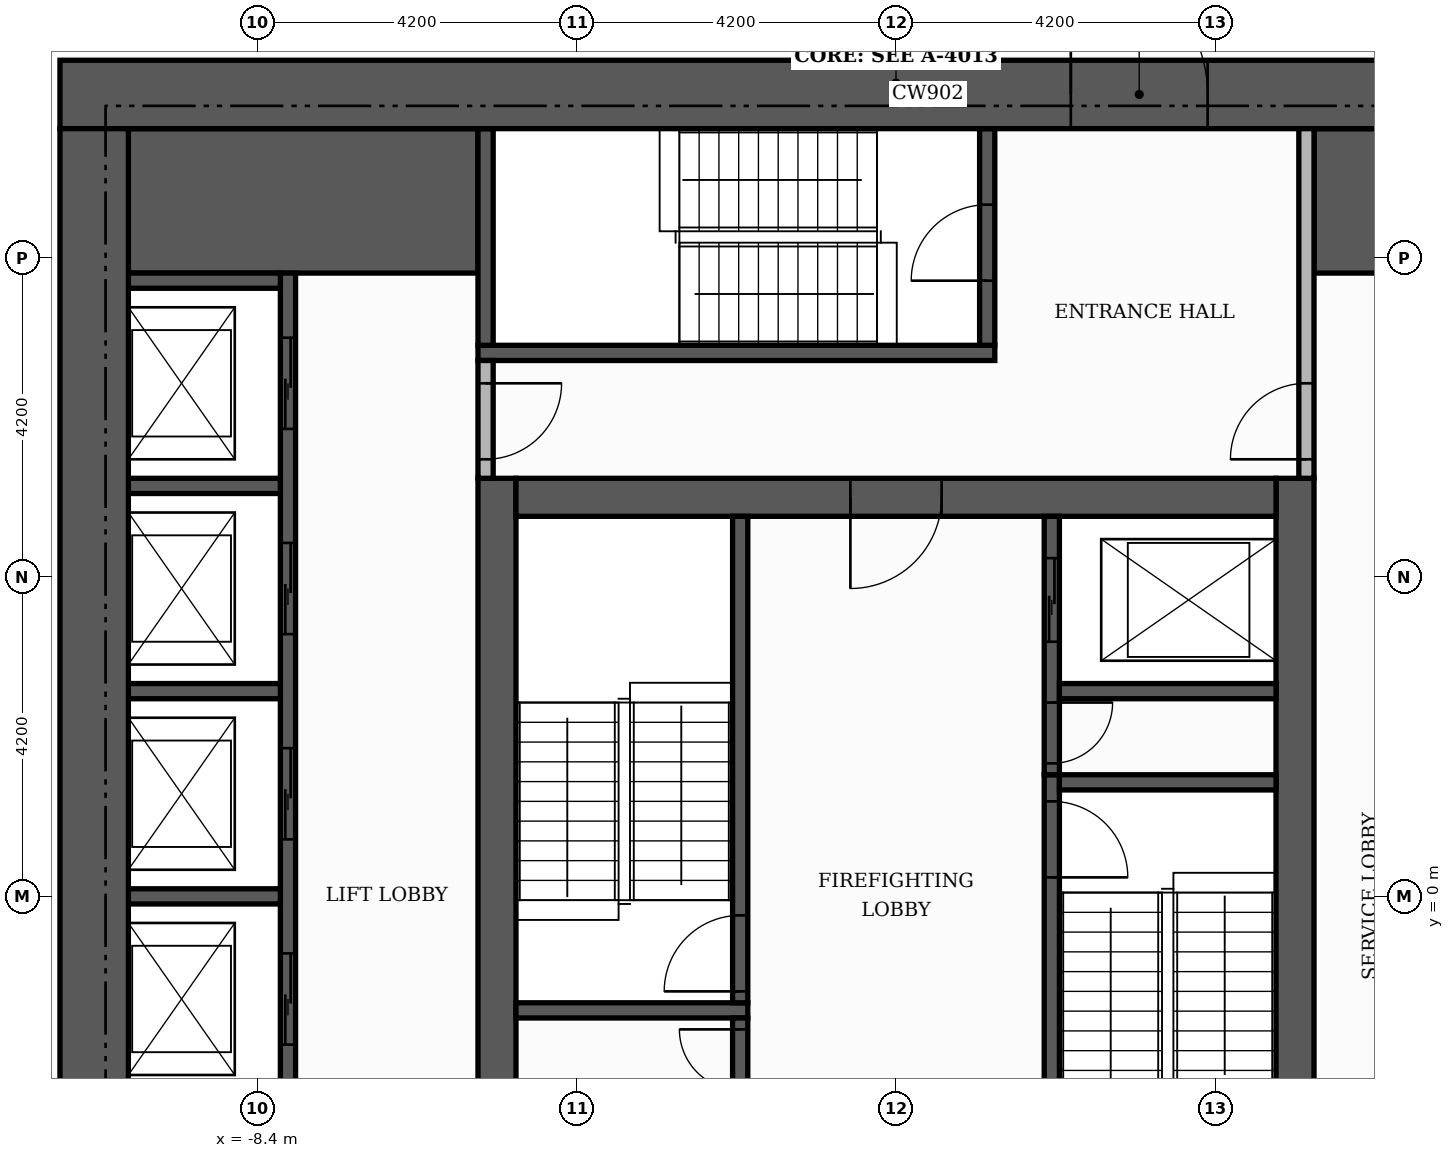
"""IFC4 building model, lengths in metres.
Left out: names, types, materials, properties, quantities, classifications, styles, units other than length and angle.
Written with IfcOpenShell. Run it as: python <this file> out.ifc"""

import sys

from ifc_helpers import new_model, si_unit, direction, frame, frame_2d, origin, place, context, subcontext, project, spatial, rectangle, extrude, element, fill, save


model = new_model("IFC4")
c1 = context("Model", 3, precision=1e-05, world=origin(), true_north=direction((0.0, 1.0)))
c2 = subcontext(c1, "Body", "Model", "MODEL_VIEW")
j1 = project(units=[si_unit("LENGTHUNIT", "METRE"), si_unit("PLANEANGLEUNIT", "RADIAN")], contexts=[c1])
p1 = place(None, origin())
s1 = spatial("IfcSite", under=j1, at=p1, CompositionType="ELEMENT")
p2 = place(p1, origin())
s2 = spatial("IfcBuilding", under=s1, at=p2, CompositionType="ELEMENT")
p3 = place(p2, frame((0.0, 0.0, 79.2)))
s3 = spatial("IfcBuildingStorey", under=s2, at=p3, CompositionType="ELEMENT", Elevation=79.2)
for number, where, z_axis, x_axis in (
    (1, (-5.25, -5.0, 0.0), (0.0, 0.0, 1.0), (0.0, 1.0, 0.0)),
    (2, (5.25, -5.0, 0.0), (0.0, 0.0, 1.0), (0.0, 1.0, 0.0)),
):
    element("IfcWall", number, at=place(p3, frame(where, z_axis=z_axis, x_axis=x_axis)), inside=s3, PredefinedType="SHEAR", context=c2, shape_type="SweptSolid", body=[
        extrude(rectangle(XDim=10.5, YDim=0.5, at=frame_2d((5.25, 0.0))), origin(), (0.0, 0.0, 1.0), 3.48),
    ])
p4 = place(p3, frame((-5.0, 5.25, 0.0), z_axis=(0.0, 0.0, 1.0), x_axis=(1.0, 0.0, 0.0)))
e3 = element("IfcWall", 3, at=p4, inside=s3, PredefinedType="SHEAR", context=c2, shape_type="SweptSolid", body=[
    extrude(rectangle(XDim=10.0, YDim=0.5, at=frame_2d((5.0, 0.0))), origin(), (0.0, 0.0, 1.0), 3.48),
])
p5 = place(p4, frame((4.4, 0.0, 0.0)))
e4 = element("IfcOpeningElement", 4, at=p5, cuts=e3, PredefinedType="OPENING", context=c2, shape_type="SweptSolid", body=[
    extrude(rectangle(XDim=1.2, YDim=2.1, at=frame_2d((0.6, 1.05))), frame((0.0, 0.26, 0.0), z_axis=(0.0, -1.0, 0.0), x_axis=(1.0, 0.0, 0.0)), (0.0, 0.0, 1.0), 0.52),
])
for number, where, z_axis, x_axis in (
    (5, (-10.1, 9.15, 0.0), (0.0, 0.0, 1.0), (1.0, 0.0, 0.0)),
    (6, (5.5, 9.15, 0.0), (0.0, 0.0, 1.0), (1.0, 0.0, 0.0)),
):
    element("IfcWall", number, at=place(p3, frame(where, z_axis=z_axis, x_axis=x_axis)), inside=s3, PredefinedType="SHEAR", context=c2, shape_type="SweptSolid", body=[
        extrude(rectangle(XDim=4.6, YDim=1.9, at=frame_2d((2.3, 0.0))), origin(), (0.0, 0.0, 1.0), 3.48),
    ])
p6 = place(p3, frame((2.05, -5.0, 0.0), z_axis=(0.0, 0.0, 1.0), x_axis=(0.0, 1.0, 0.0)))
e7 = element("IfcWall", 7, at=p6, inside=s3, PredefinedType="SHEAR", context=c2, shape_type="SweptSolid", body=[
    extrude(rectangle(XDim=6.6, YDim=0.2, at=frame_2d((3.3, 0.0))), origin(), (0.0, 0.0, 1.0), 3.48),
])
p7 = place(p6, frame((5.25, 0.0, 0.0)))
e8 = element("IfcOpeningElement", 8, at=p7, cuts=e7, PredefinedType="OPENING", context=c2, shape_type="SweptSolid", body=[
    extrude(rectangle(XDim=1.0, YDim=2.1, at=frame_2d((0.5, 1.05))), frame((0.0, 0.11, 0.0), z_axis=(0.0, -1.0, 0.0), x_axis=(1.0, 0.0, 0.0)), (0.0, 0.0, 1.0), 0.22),
])
p8 = place(p3, frame((-5.0, -1.5, 0.0), z_axis=(0.0, 0.0, 1.0), x_axis=(1.0, 0.0, 0.0)))
e9 = element("IfcWall", 9, at=p8, inside=s3, PredefinedType="SHEAR", context=c2, shape_type="SweptSolid", body=[
    extrude(rectangle(XDim=3.05, YDim=0.2, at=frame_2d((1.525, 0.0))), origin(), (0.0, 0.0, 1.0), 3.48),
])
p9 = place(p3, frame((-2.05, -1.4, 0.0), z_axis=(0.0, 0.0, 1.0), x_axis=(0.0, 1.0, 0.0)))
e10 = element("IfcWall", 10, at=p9, inside=s3, PredefinedType="SHEAR", context=c2, shape_type="SweptSolid", body=[
    extrude(rectangle(XDim=6.4, YDim=0.2, at=frame_2d((3.2, 0.0))), origin(), (0.0, 0.0, 1.0), 3.48),
])
p10 = place(p9, frame((0.15, 0.0, 0.0)))
e11 = element("IfcOpeningElement", 11, at=p10, cuts=e10, PredefinedType="OPENING", context=c2, shape_type="SweptSolid", body=[
    extrude(rectangle(XDim=1.0, YDim=2.1, at=frame_2d((0.5, 1.05))), frame((0.0, 0.11, 0.0), z_axis=(0.0, -1.0, 0.0), x_axis=(1.0, 0.0, 0.0)), (0.0, 0.0, 1.0), 0.22),
])
p11 = place(p3, frame((2.15, 1.5, 0.0), z_axis=(0.0, 0.0, 1.0), x_axis=(1.0, 0.0, 0.0)))
e12 = element("IfcWall", 12, at=p11, inside=s3, PredefinedType="SHEAR", context=c2, shape_type="SweptSolid", body=[
    extrude(rectangle(XDim=2.85, YDim=0.2, at=frame_2d((1.425, 0.0))), origin(), (0.0, 0.0, 1.0), 3.48),
])
p12 = place(p3, frame((-5.5, 7.15, 0.0), z_axis=(0.0, 0.0, 1.0), x_axis=(1.0, 0.0, 0.0)))
e13 = element("IfcWall", 13, at=p12, inside=s3, PredefinedType="SHEAR", context=c2, shape_type="SweptSolid", body=[
    extrude(rectangle(XDim=6.8, YDim=0.2, at=frame_2d((3.4, 0.0))), origin(), (0.0, 0.0, 1.0), 3.48),
])
p13 = place(p3, frame((-5.4, 7.25, 0.0), z_axis=(0.0, 0.0, 1.0), x_axis=(0.0, 1.0, 0.0)))
e14 = element("IfcWall", 14, at=p13, inside=s3, PredefinedType="SHEAR", context=c2, shape_type="SweptSolid", body=[
    extrude(rectangle(XDim=2.85, YDim=0.2, at=frame_2d((1.425, 0.0))), origin(), (0.0, 0.0, 1.0), 3.48),
])
p14 = place(p3, frame((1.2, 7.25, 0.0), z_axis=(0.0, 0.0, 1.0), x_axis=(0.0, 1.0, 0.0)))
e15 = element("IfcWall", 15, at=p14, inside=s3, PredefinedType="SHEAR", context=c2, shape_type="SweptSolid", body=[
    extrude(rectangle(XDim=2.85, YDim=0.2, at=frame_2d((1.425, 0.0))), origin(), (0.0, 0.0, 1.0), 3.48),
])
p15 = place(p14, frame((0.85, 0.0, 0.0)))
e16 = element("IfcOpeningElement", 16, at=p15, cuts=e15, PredefinedType="OPENING", context=c2, shape_type="SweptSolid", body=[
    extrude(rectangle(XDim=1.0, YDim=2.1, at=frame_2d((0.5, 1.05))), frame((0.0, 0.11, 0.0), z_axis=(0.0, -1.0, 0.0), x_axis=(1.0, 0.0, 0.0)), (0.0, 0.0, 1.0), 0.22),
])
p16 = place(p3, frame((-8.0, -8.0, 0.0), z_axis=(0.0, 0.0, 1.0), x_axis=(0.0, 1.0, 0.0)))
e17 = element("IfcWall", 17, at=p16, inside=s3, PredefinedType="SHEAR", context=c2, shape_type="SweptSolid", body=[
    extrude(rectangle(XDim=16.2, YDim=0.2, at=frame_2d((8.1, 0.0))), origin(), (0.0, 0.0, 1.0), 3.48),
])
p17 = place(p16, frame((0.65, 0.0, 0.0)))
e18 = element("IfcOpeningElement", 18, at=p17, cuts=e17, PredefinedType="OPENING", context=c2, shape_type="SweptSolid", body=[
    extrude(rectangle(XDim=1.2, YDim=2.1, at=frame_2d((0.6, 1.05))), frame((0.0, 0.11, 0.0), z_axis=(0.0, -1.0, 0.0), x_axis=(1.0, 0.0, 0.0)), (0.0, 0.0, 1.0), 0.22),
])
p18 = place(p16, frame((3.35, 0.0, 0.0)))
e19 = element("IfcOpeningElement", 19, at=p18, cuts=e17, PredefinedType="OPENING", context=c2, shape_type="SweptSolid", body=[
    extrude(rectangle(XDim=1.2, YDim=2.1, at=frame_2d((0.6, 1.05))), frame((0.0, 0.11, 0.0), z_axis=(0.0, -1.0, 0.0), x_axis=(1.0, 0.0, 0.0)), (0.0, 0.0, 1.0), 0.22),
])
p19 = place(p16, frame((6.05, 0.0, 0.0)))
e20 = element("IfcOpeningElement", 20, at=p19, cuts=e17, PredefinedType="OPENING", context=c2, shape_type="SweptSolid", body=[
    extrude(rectangle(XDim=1.2, YDim=2.1, at=frame_2d((0.6, 1.05))), frame((0.0, 0.11, 0.0), z_axis=(0.0, -1.0, 0.0), x_axis=(1.0, 0.0, 0.0)), (0.0, 0.0, 1.0), 0.22),
])
p20 = place(p16, frame((8.75, 0.0, 0.0)))
e21 = element("IfcOpeningElement", 21, at=p20, cuts=e17, PredefinedType="OPENING", context=c2, shape_type="SweptSolid", body=[
    extrude(rectangle(XDim=1.2, YDim=2.1, at=frame_2d((0.6, 1.05))), frame((0.0, 0.11, 0.0), z_axis=(0.0, -1.0, 0.0), x_axis=(1.0, 0.0, 0.0)), (0.0, 0.0, 1.0), 0.22),
])
p21 = place(p16, frame((11.45, 0.0, 0.0)))
e22 = element("IfcOpeningElement", 22, at=p21, cuts=e17, PredefinedType="OPENING", context=c2, shape_type="SweptSolid", body=[
    extrude(rectangle(XDim=1.2, YDim=2.1, at=frame_2d((0.6, 1.05))), frame((0.0, 0.11, 0.0), z_axis=(0.0, -1.0, 0.0), x_axis=(1.0, 0.0, 0.0)), (0.0, 0.0, 1.0), 0.22),
])
p22 = place(p16, frame((14.15, 0.0, 0.0)))
e23 = element("IfcOpeningElement", 23, at=p22, cuts=e17, PredefinedType="OPENING", context=c2, shape_type="SweptSolid", body=[
    extrude(rectangle(XDim=1.2, YDim=2.1, at=frame_2d((0.6, 1.05))), frame((0.0, 0.11, 0.0), z_axis=(0.0, -1.0, 0.0), x_axis=(1.0, 0.0, 0.0)), (0.0, 0.0, 1.0), 0.22),
])
p23 = place(p3, frame((-2.05, -5.0, 0.0), z_axis=(0.0, 0.0, 1.0), x_axis=(0.0, 1.0, 0.0)))
e24 = element("IfcWall", 24, at=p23, inside=s3, PredefinedType="SHEAR", context=c2, shape_type="SweptSolid", body=[
    extrude(rectangle(XDim=3.4, YDim=0.2, at=frame_2d((1.7, 0.0))), origin(), (0.0, 0.0, 1.0), 3.48),
])
p24 = place(p23, frame((0.55, 0.0, 0.0)))
e25 = element("IfcOpeningElement", 25, at=p24, cuts=e24, PredefinedType="OPENING", context=c2, shape_type="SweptSolid", body=[
    extrude(rectangle(XDim=1.1, YDim=2.1, at=frame_2d((0.55, 1.05))), frame((0.0, 0.11, 0.0), z_axis=(0.0, -1.0, 0.0), x_axis=(1.0, 0.0, 0.0)), (0.0, 0.0, 1.0), 0.22),
])
p25 = place(p23, frame((2.45, 0.0, 0.0)))
e26 = element("IfcOpeningElement", 26, at=p25, cuts=e24, PredefinedType="OPENING", context=c2, shape_type="SweptSolid", body=[
    extrude(rectangle(XDim=0.8, YDim=2.1, at=frame_2d((0.4, 1.05))), frame((0.0, 0.11, 0.0), z_axis=(0.0, -1.0, 0.0), x_axis=(1.0, 0.0, 0.0)), (0.0, 0.0, 1.0), 0.22),
])
p26 = place(p3, frame((-10.1, 0.0, 0.0), z_axis=(0.0, 0.0, 1.0), x_axis=(1.0, 0.0, 0.0)))
e27 = element("IfcWall", 27, at=p26, inside=s3, PredefinedType="SHEAR", context=c2, shape_type="SweptSolid", body=[
    extrude(rectangle(XDim=2.0, YDim=0.2, at=frame_2d((1.0, 0.0))), origin(), (0.0, 0.0, 1.0), 3.48),
])
p27 = place(p3, frame((2.05, 1.6, 0.0), z_axis=(0.0, 0.0, 1.0), x_axis=(0.0, 1.0, 0.0)))
e28 = element("IfcWall", 28, at=p27, inside=s3, PredefinedType="SHEAR", context=c2, shape_type="SweptSolid", body=[
    extrude(rectangle(XDim=3.4, YDim=0.2, at=frame_2d((1.7, 0.0))), origin(), (0.0, 0.0, 1.0), 3.48),
])
p28 = place(p27, frame((1.75, 0.0, 0.0)))
e29 = element("IfcOpeningElement", 29, at=p28, cuts=e28, PredefinedType="OPENING", context=c2, shape_type="SweptSolid", body=[
    extrude(rectangle(XDim=1.1, YDim=2.1, at=frame_2d((0.55, 1.05))), frame((0.0, 0.11, 0.0), z_axis=(0.0, -1.0, 0.0), x_axis=(1.0, 0.0, 0.0)), (0.0, 0.0, 1.0), 0.22),
])
p29 = place(p27, frame((0.15, 0.0, 0.0)))
e30 = element("IfcOpeningElement", 30, at=p29, cuts=e28, PredefinedType="OPENING", context=c2, shape_type="SweptSolid", body=[
    extrude(rectangle(XDim=0.8, YDim=2.1, at=frame_2d((0.4, 1.05))), frame((0.0, 0.11, 0.0), z_axis=(0.0, -1.0, 0.0), x_axis=(1.0, 0.0, 0.0)), (0.0, 0.0, 1.0), 0.22),
])
p30 = place(p3, frame((-10.1, 2.7, 0.0), z_axis=(0.0, 0.0, 1.0), x_axis=(1.0, 0.0, 0.0)))
e31 = element("IfcWall", 31, at=p30, inside=s3, PredefinedType="SHEAR", context=c2, shape_type="SweptSolid", body=[
    extrude(rectangle(XDim=2.0, YDim=0.2, at=frame_2d((1.0, 0.0))), origin(), (0.0, 0.0, 1.0), 3.48),
])
p31 = place(p3, frame((2.15, 2.7, 0.0), z_axis=(0.0, 0.0, 1.0), x_axis=(1.0, 0.0, 0.0)))
e32 = element("IfcWall", 32, at=p31, inside=s3, PredefinedType="SHEAR", context=c2, shape_type="SweptSolid", body=[
    extrude(rectangle(XDim=2.85, YDim=0.2, at=frame_2d((1.425, 0.0))), origin(), (0.0, 0.0, 1.0), 3.48),
])
for number, where, z_axis, x_axis in (
    (33, (-10.1, 5.4, 0.0), (0.0, 0.0, 1.0), (1.0, 0.0, 0.0)),
    (34, (-10.1, 8.1, 0.0), (0.0, 0.0, 1.0), (1.0, 0.0, 0.0)),
):
    element("IfcWall", number, at=place(p3, frame(where, z_axis=z_axis, x_axis=x_axis)), inside=s3, PredefinedType="SHEAR", context=c2, shape_type="SweptSolid", body=[
        extrude(rectangle(XDim=2.0, YDim=0.2, at=frame_2d((1.0, 0.0))), origin(), (0.0, 0.0, 1.0), 3.48),
    ])
p32 = place(p3, frame((-11.0, 10.55, 0.0), z_axis=(0.0, 0.0, 1.0), x_axis=(1.0, 0.0, 0.0)))
e35 = element("IfcWall", 35, at=p32, inside=s3, PredefinedType="SHEAR", context=c2, shape_type="SweptSolid", body=[
    extrude(rectangle(XDim=22.0, YDim=0.9, at=frame_2d((11.0, 0.0))), origin(), (0.0, 0.0, 1.0), 3.48),
])
p33 = place(p32, frame((13.3, 0.0, 0.0)))
e36 = element("IfcOpeningElement", 36, at=p33, cuts=e35, PredefinedType="OPENING", context=c2, shape_type="SweptSolid", body=[
    extrude(rectangle(XDim=1.8, YDim=2.2, at=frame_2d((0.9, 1.1))), frame((0.0, 0.46, 0.0), z_axis=(0.0, -1.0, 0.0), x_axis=(1.0, 0.0, 0.0)), (0.0, 0.0, 1.0), 0.92),
])
p34 = place(p3, frame((-10.55, -10.1, 0.0), z_axis=(0.0, 0.0, 1.0), x_axis=(0.0, 1.0, 0.0)))
e37 = element("IfcWall", 37, at=p34, inside=s3, PredefinedType="SHEAR", context=c2, shape_type="SweptSolid", body=[
    extrude(rectangle(XDim=20.2, YDim=0.9, at=frame_2d((10.1, 0.0))), origin(), (0.0, 0.0, 1.0), 3.48),
])
p35 = place(p3, frame((-5.4, 5.5, 0.0), z_axis=(0.0, 0.0, 1.0), x_axis=(0.0, 1.0, 0.0)))
e38 = element("IfcWall", 38, at=p35, inside=s3, PredefinedType="PARTITIONING", context=c2, shape_type="SweptSolid", body=[
    extrude(rectangle(XDim=1.55, YDim=0.2, at=frame_2d((0.775, 0.0))), origin(), (0.0, 0.0, 1.0), 3.48),
])
p36 = place(p35, frame((0.25, 0.0, 0.0)))
e39 = element("IfcOpeningElement", 39, at=p36, cuts=e38, PredefinedType="OPENING", context=c2, shape_type="SweptSolid", body=[
    extrude(rectangle(XDim=1.0, YDim=2.1, at=frame_2d((0.5, 1.05))), frame((0.0, 0.11, 0.0), z_axis=(0.0, -1.0, 0.0), x_axis=(1.0, 0.0, 0.0)), (0.0, 0.0, 1.0), 0.22),
])
p37 = place(p3, frame((5.4, 5.5, 0.0), z_axis=(0.0, 0.0, 1.0), x_axis=(0.0, 1.0, 0.0)))
e40 = element("IfcWall", 40, at=p37, inside=s3, PredefinedType="PARTITIONING", context=c2, shape_type="SweptSolid", body=[
    extrude(rectangle(XDim=4.6, YDim=0.2, at=frame_2d((2.3, 0.0))), origin(), (0.0, 0.0, 1.0), 3.48),
])
p38 = place(p37, frame((0.25, 0.0, 0.0)))
e41 = element("IfcOpeningElement", 41, at=p38, cuts=e40, PredefinedType="OPENING", context=c2, shape_type="SweptSolid", body=[
    extrude(rectangle(XDim=1.0, YDim=2.1, at=frame_2d((0.5, 1.05))), frame((0.0, 0.11, 0.0), z_axis=(0.0, -1.0, 0.0), x_axis=(1.0, 0.0, 0.0)), (0.0, 0.0, 1.0), 0.22),
])
p39 = place(p19, origin())
e42 = element("IfcDoor", 42, at=p39, inside=s3, OperationType="SLIDING_TO_LEFT", PredefinedType="DOOR", context=c2, shape_type="SweptSolid", body=[
    extrude(rectangle(XDim=1.2, YDim=2.1, at=frame_2d((0.6, 1.05))), frame((0.0, 0.025, 0.0), z_axis=(0.0, -1.0, 0.0), x_axis=(1.0, 0.0, 0.0)), (0.0, 0.0, 1.0), 0.05),
])
fill(e20, e42)
p40 = place(p20, origin())
e43 = element("IfcDoor", 43, at=p40, inside=s3, OperationType="SLIDING_TO_LEFT", PredefinedType="DOOR", context=c2, shape_type="SweptSolid", body=[
    extrude(rectangle(XDim=1.2, YDim=2.1, at=frame_2d((0.6, 1.05))), frame((0.0, 0.025, 0.0), z_axis=(0.0, -1.0, 0.0), x_axis=(1.0, 0.0, 0.0)), (0.0, 0.0, 1.0), 0.05),
])
fill(e21, e43)
p41 = place(p21, origin())
e44 = element("IfcDoor", 44, at=p41, inside=s3, OperationType="SLIDING_TO_LEFT", PredefinedType="DOOR", context=c2, shape_type="SweptSolid", body=[
    extrude(rectangle(XDim=1.2, YDim=2.1, at=frame_2d((0.6, 1.05))), frame((0.0, 0.025, 0.0), z_axis=(0.0, -1.0, 0.0), x_axis=(1.0, 0.0, 0.0)), (0.0, 0.0, 1.0), 0.05),
])
fill(e22, e44)
p42 = place(p22, origin())
e45 = element("IfcDoor", 45, at=p42, inside=s3, OperationType="SLIDING_TO_LEFT", PredefinedType="DOOR", context=c2, shape_type="SweptSolid", body=[
    extrude(rectangle(XDim=1.2, YDim=2.1, at=frame_2d((0.6, 1.05))), frame((0.0, 0.025, 0.0), z_axis=(0.0, -1.0, 0.0), x_axis=(1.0, 0.0, 0.0)), (0.0, 0.0, 1.0), 0.05),
])
fill(e23, e45)
p43 = place(p28, origin())
e46 = element("IfcDoor", 46, at=p43, inside=s3, OperationType="SLIDING_TO_LEFT", PredefinedType="DOOR", context=c2, shape_type="SweptSolid", body=[
    extrude(rectangle(XDim=1.1, YDim=2.1, at=frame_2d((0.55, 1.05))), frame((0.0, 0.025, 0.0), z_axis=(0.0, -1.0, 0.0), x_axis=(1.0, 0.0, 0.0)), (0.0, 0.0, 1.0), 0.05),
])
fill(e29, e46)
p44 = place(p10, origin())
e47 = element("IfcDoor", 47, at=p44, inside=s3, OperationType="SINGLE_SWING_LEFT", PredefinedType="DOOR", context=c2, shape_type="SweptSolid", body=[
    extrude(rectangle(XDim=1.0, YDim=2.1, at=frame_2d((0.5, 1.05))), frame((0.0, 0.025, 0.0), z_axis=(0.0, -1.0, 0.0), x_axis=(1.0, 0.0, 0.0)), (0.0, 0.0, 1.0), 0.05),
])
fill(e11, e47)
p45 = place(p7, frame((1.0, 0.0, 0.0), z_axis=(0.0, 0.0, 1.0), x_axis=(-1.0, 0.0, 0.0)))
e48 = element("IfcDoor", 48, at=p45, inside=s3, OperationType="SINGLE_SWING_LEFT", PredefinedType="DOOR", context=c2, shape_type="SweptSolid", body=[
    extrude(rectangle(XDim=1.0, YDim=2.1, at=frame_2d((0.5, 1.05))), frame((0.0, 0.025, 0.0), z_axis=(0.0, -1.0, 0.0), x_axis=(1.0, 0.0, 0.0)), (0.0, 0.0, 1.0), 0.05),
])
fill(e8, e48)
p46 = place(p29, frame((0.8, 0.0, 0.0), z_axis=(0.0, 0.0, 1.0), x_axis=(-1.0, 0.0, 0.0)))
e49 = element("IfcDoor", 49, at=p46, inside=s3, OperationType="SINGLE_SWING_RIGHT", PredefinedType="DOOR", context=c2, shape_type="SweptSolid", body=[
    extrude(rectangle(XDim=0.8, YDim=2.1, at=frame_2d((0.4, 1.05))), frame((0.0, 0.025, 0.0), z_axis=(0.0, -1.0, 0.0), x_axis=(1.0, 0.0, 0.0)), (0.0, 0.0, 1.0), 0.05),
])
fill(e30, e49)
p47 = place(p25, origin())
e50 = element("IfcDoor", 50, at=p47, inside=s3, OperationType="SINGLE_SWING_RIGHT", PredefinedType="DOOR", context=c2, shape_type="SweptSolid", body=[
    extrude(rectangle(XDim=0.8, YDim=2.1, at=frame_2d((0.4, 1.05))), frame((0.0, 0.025, 0.0), z_axis=(0.0, -1.0, 0.0), x_axis=(1.0, 0.0, 0.0)), (0.0, 0.0, 1.0), 0.05),
])
fill(e26, e50)
p48 = place(p5, frame((1.2, 0.0, 0.0), z_axis=(0.0, 0.0, 1.0), x_axis=(-1.0, 0.0, 0.0)))
e51 = element("IfcDoor", 51, at=p48, inside=s3, OperationType="SINGLE_SWING_LEFT", PredefinedType="DOOR", context=c2, shape_type="SweptSolid", body=[
    extrude(rectangle(XDim=1.2, YDim=2.1, at=frame_2d((0.6, 1.05))), frame((0.0, 0.025, 0.0), z_axis=(0.0, -1.0, 0.0), x_axis=(1.0, 0.0, 0.0)), (0.0, 0.0, 1.0), 0.05),
])
fill(e4, e51)
p49 = place(p15, origin())
e52 = element("IfcDoor", 52, at=p49, inside=s3, OperationType="SINGLE_SWING_LEFT", PredefinedType="DOOR", context=c2, shape_type="SweptSolid", body=[
    extrude(rectangle(XDim=1.0, YDim=2.1, at=frame_2d((0.5, 1.05))), frame((0.0, 0.025, 0.0), z_axis=(0.0, -1.0, 0.0), x_axis=(1.0, 0.0, 0.0)), (0.0, 0.0, 1.0), 0.05),
])
fill(e16, e52)
p50 = place(p36, frame((1.0, 0.0, 0.0), z_axis=(0.0, 0.0, 1.0), x_axis=(-1.0, 0.0, 0.0)))
e53 = element("IfcDoor", 53, at=p50, inside=s3, OperationType="SINGLE_SWING_RIGHT", PredefinedType="DOOR", context=c2, shape_type="SweptSolid", body=[
    extrude(rectangle(XDim=1.0, YDim=2.1, at=frame_2d((0.5, 1.05))), frame((0.0, 0.025, 0.0), z_axis=(0.0, -1.0, 0.0), x_axis=(1.0, 0.0, 0.0)), (0.0, 0.0, 1.0), 0.05),
])
fill(e39, e53)
p51 = place(p38, origin())
e54 = element("IfcDoor", 54, at=p51, inside=s3, OperationType="SINGLE_SWING_LEFT", PredefinedType="DOOR", context=c2, shape_type="SweptSolid", body=[
    extrude(rectangle(XDim=1.0, YDim=2.1, at=frame_2d((0.5, 1.05))), frame((0.0, 0.025, 0.0), z_axis=(0.0, -1.0, 0.0), x_axis=(1.0, 0.0, 0.0)), (0.0, 0.0, 1.0), 0.05),
])
fill(e41, e54)
p52 = place(p33, origin())
e55 = element("IfcDoor", 55, at=p52, inside=s3, OperationType="DOUBLE_DOOR_SINGLE_SWING", PredefinedType="DOOR", context=c2, shape_type="SweptSolid", body=[
    extrude(rectangle(XDim=1.8, YDim=2.2, at=frame_2d((0.9, 1.1))), frame((0.0, 0.025, 0.0), z_axis=(0.0, -1.0, 0.0), x_axis=(1.0, 0.0, 0.0)), (0.0, 0.0, 1.0), 0.05),
])
fill(e36, e55)
save(model, sys.argv[1])
